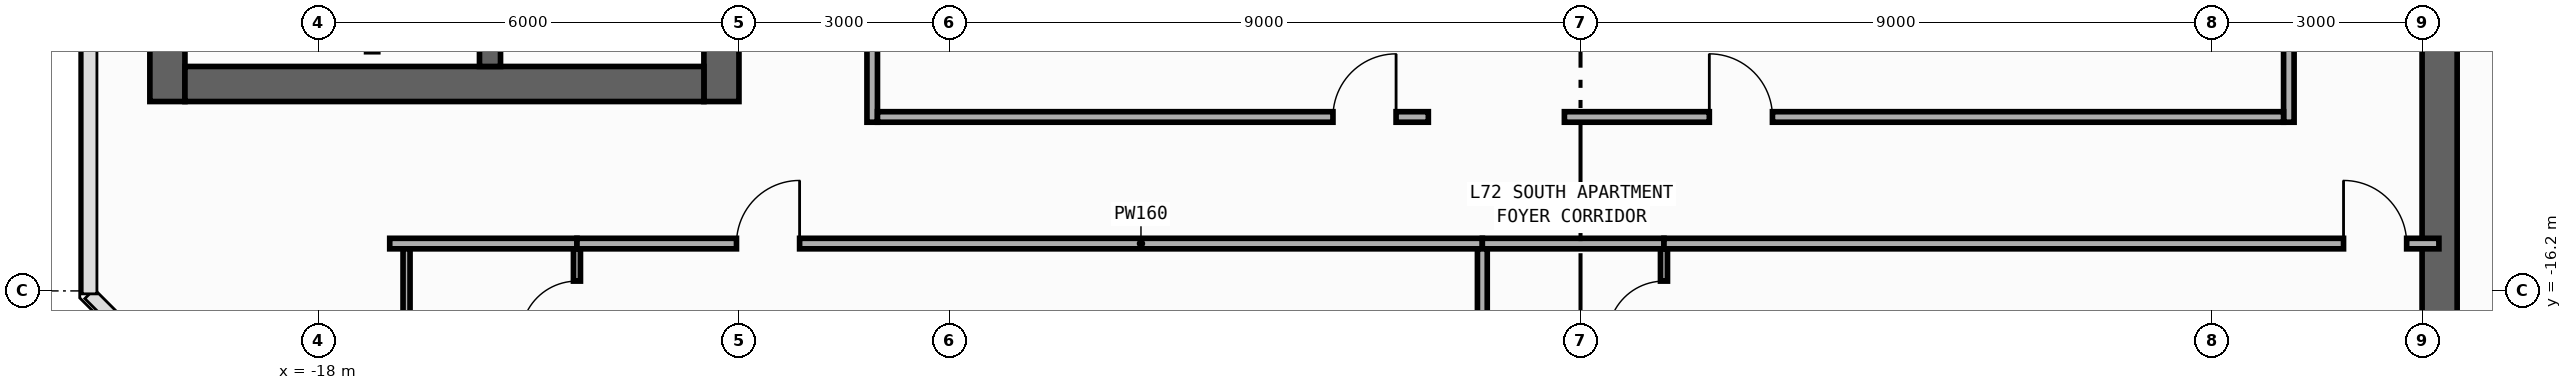
"""IFC4 building model, lengths in metres.
Left out: names, types, materials, properties, quantities, classifications, styles, units other than length and angle.
Written with IfcOpenShell. Run it as: python <this file> out.ifc"""

import sys

from ifc_helpers import new_model, si_unit, direction, frame, frame_2d, origin, place, context, subcontext, project, spatial, rectangle, extrude, element, fill, save


model = new_model("IFC4")
c1 = context("Model", 3, precision=1e-05, world=origin(), true_north=direction((0.0, 1.0)))
c2 = subcontext(c1, "Body", "Model", "MODEL_VIEW")
j1 = project(units=[si_unit("LENGTHUNIT", "METRE"), si_unit("PLANEANGLEUNIT", "RADIAN")], contexts=[c1])
p1 = place(None, origin())
s1 = spatial("IfcSite", under=j1, at=p1, CompositionType="ELEMENT")
p2 = place(p1, origin())
s2 = spatial("IfcBuilding", under=s1, at=p2, CompositionType="ELEMENT")
p3 = place(p2, frame((0.0, 0.0, 300.4)))
s3 = spatial("IfcBuildingStorey", under=s2, at=p3, CompositionType="ELEMENT", Elevation=300.4)
p4 = place(p3, frame((-20.15, -13.5, 0.0), z_axis=(0.0, 0.0, 1.0), x_axis=(0.0, 1.0, 0.0)))
e1 = element("IfcWall", 1, at=p4, inside=s3, PredefinedType="SHEAR", context=c2, shape_type="SweptSolid", body=[
    extrude(rectangle(XDim=27.0, YDim=0.5, at=frame_2d((13.5, 0.0))), origin(), (0.0, 0.0, 1.0), 3.54),
])
p5 = place(p3, frame((-12.25, -13.5, 0.0), z_axis=(0.0, 0.0, 1.0), x_axis=(0.0, 1.0, 0.0)))
e2 = element("IfcWall", 2, at=p5, inside=s3, PredefinedType="SHEAR", context=c2, shape_type="SweptSolid", body=[
    extrude(rectangle(XDim=27.0, YDim=0.5, at=frame_2d((13.5, 0.0))), origin(), (0.0, 0.0, 1.0), 3.54),
])
p6 = place(p5, frame((15.175, 0.0, 0.0)))
e3 = element("IfcOpeningElement", 3, at=p6, cuts=e2, PredefinedType="OPENING", context=c2, shape_type="SweptSolid", body=[
    extrude(rectangle(XDim=0.85, YDim=2.1, at=frame_2d((0.425, 1.05))), frame((0.0, 0.26, 0.0), z_axis=(0.0, -1.0, 0.0), x_axis=(1.0, 0.0, 0.0)), (0.0, 0.0, 1.0), 0.52),
])
p7 = place(p5, frame((21.275, 0.0, 0.0)))
e4 = element("IfcOpeningElement", 4, at=p7, cuts=e2, PredefinedType="OPENING", context=c2, shape_type="SweptSolid", body=[
    extrude(rectangle(XDim=0.85, YDim=2.1, at=frame_2d((0.425, 1.05))), frame((0.0, 0.26, 0.0), z_axis=(0.0, -1.0, 0.0), x_axis=(1.0, 0.0, 0.0)), (0.0, 0.0, 1.0), 0.52),
])
p8 = place(p5, frame((4.275, 0.0, 0.0)))
e5 = element("IfcOpeningElement", 5, at=p8, cuts=e2, PredefinedType="OPENING", context=c2, shape_type="SweptSolid", body=[
    extrude(rectangle(XDim=0.85, YDim=2.1, at=frame_2d((0.425, 1.05))), frame((0.0, 0.26, 0.0), z_axis=(0.0, -1.0, 0.0), x_axis=(1.0, 0.0, 0.0)), (0.0, 0.0, 1.0), 0.52),
])
p9 = place(p5, frame((10.275, 0.0, 0.0)))
e6 = element("IfcOpeningElement", 6, at=p9, cuts=e2, PredefinedType="OPENING", context=c2, shape_type="SweptSolid", body=[
    extrude(rectangle(XDim=0.85, YDim=2.1, at=frame_2d((0.425, 1.05))), frame((0.0, 0.26, 0.0), z_axis=(0.0, -1.0, 0.0), x_axis=(1.0, 0.0, 0.0)), (0.0, 0.0, 1.0), 0.52),
])
p10 = place(p5, frame((12.725, 0.0, 0.0)))
e7 = element("IfcOpeningElement", 7, at=p10, cuts=e2, PredefinedType="OPENING", context=c2, shape_type="SweptSolid", body=[
    extrude(rectangle(XDim=1.15, YDim=2.2, at=frame_2d((0.575, 1.1))), frame((0.0, 0.26, 0.0), z_axis=(0.0, -1.0, 0.0), x_axis=(1.0, 0.0, 0.0)), (0.0, 0.0, 1.0), 0.52),
])
p11 = place(p5, frame((1.625, 0.0, 0.0)))
e8 = element("IfcOpeningElement", 8, at=p11, cuts=e2, PredefinedType="OPENING", context=c2, shape_type="SweptSolid", body=[
    extrude(rectangle(XDim=0.85, YDim=2.1, at=frame_2d((0.425, 1.05))), frame((0.0, 0.26, 0.0), z_axis=(0.0, -1.0, 0.0), x_axis=(1.0, 0.0, 0.0)), (0.0, 0.0, 1.0), 0.52),
])
p12 = place(p3, frame((-19.9, -13.25, 0.0), z_axis=(0.0, 0.0, 1.0), x_axis=(1.0, 0.0, 0.0)))
e9 = element("IfcWall", 9, at=p12, inside=s3, PredefinedType="SHEAR", context=c2, shape_type="SweptSolid", body=[
    extrude(rectangle(XDim=7.4, YDim=0.5, at=frame_2d((3.7, 0.0))), origin(), (0.0, 0.0, 1.0), 3.54),
])
p13 = place(p3, frame((-15.55, -13.0, 0.0), z_axis=(0.0, 0.0, 1.0), x_axis=(0.0, 1.0, 0.0)))
e10 = element("IfcWall", 10, at=p13, inside=s3, PredefinedType="SHEAR", context=c2, shape_type="SweptSolid", body=[
    extrude(rectangle(XDim=26.0, YDim=0.3, at=frame_2d((13.0, 0.0))), origin(), (0.0, 0.0, 1.0), 3.54),
])
p14 = place(p13, frame((12.225, 0.0, 0.0)))
e11 = element("IfcOpeningElement", 11, at=p14, cuts=e10, PredefinedType="OPENING", context=c2, shape_type="SweptSolid", body=[
    extrude(rectangle(XDim=1.15, YDim=2.2, at=frame_2d((0.575, 1.1))), frame((0.0, 0.16, 0.0), z_axis=(0.0, -1.0, 0.0), x_axis=(1.0, 0.0, 0.0)), (0.0, 0.0, 1.0), 0.32),
])
p15 = place(p13, frame((1.125, 0.0, 0.0)))
e12 = element("IfcOpeningElement", 12, at=p15, cuts=e10, PredefinedType="OPENING", context=c2, shape_type="SweptSolid", body=[
    extrude(rectangle(XDim=0.85, YDim=2.1, at=frame_2d((0.425, 1.05))), frame((0.0, 0.16, 0.0), z_axis=(0.0, -1.0, 0.0), x_axis=(1.0, 0.0, 0.0)), (0.0, 0.0, 1.0), 0.32),
])
p16 = place(p3, frame((12.25, -19.8, 0.0), z_axis=(0.0, 0.0, 1.0), x_axis=(0.0, 1.0, 0.0)))
e13 = element("IfcWall", 13, at=p16, inside=s3, PredefinedType="SHEAR", context=c2, shape_type="SweptSolid", body=[
    extrude(rectangle(XDim=27.0, YDim=0.5, at=frame_2d((13.5, 0.0))), origin(), (0.0, 0.0, 1.0), 3.54),
])
p17 = place(p16, frame((23.05, 0.0, 0.0)))
e14 = element("IfcOpeningElement", 14, at=p17, cuts=e13, PredefinedType="OPENING", context=c2, shape_type="SweptSolid", body=[
    extrude(rectangle(XDim=1.1, YDim=2.2, at=frame_2d((0.55, 1.1))), frame((0.0, 0.26, 0.0), z_axis=(0.0, -1.0, 0.0), x_axis=(1.0, 0.0, 0.0)), (0.0, 0.0, 1.0), 0.52),
])
p18 = place(p16, frame((19.85, 0.0, 0.0)))
e15 = element("IfcOpeningElement", 15, at=p18, cuts=e13, PredefinedType="OPENING", context=c2, shape_type="SweptSolid", body=[
    extrude(rectangle(XDim=1.1, YDim=2.2, at=frame_2d((0.55, 1.1))), frame((0.0, 0.26, 0.0), z_axis=(0.0, -1.0, 0.0), x_axis=(1.0, 0.0, 0.0)), (0.0, 0.0, 1.0), 0.52),
])
p19 = place(p16, frame((16.65, 0.0, 0.0)))
e16 = element("IfcOpeningElement", 16, at=p19, cuts=e13, PredefinedType="OPENING", context=c2, shape_type="SweptSolid", body=[
    extrude(rectangle(XDim=1.1, YDim=2.2, at=frame_2d((0.55, 1.1))), frame((0.0, 0.26, 0.0), z_axis=(0.0, -1.0, 0.0), x_axis=(1.0, 0.0, 0.0)), (0.0, 0.0, 1.0), 0.52),
])
p20 = place(p16, frame((7.175, 0.0, 0.0)))
e17 = element("IfcOpeningElement", 17, at=p20, cuts=e13, PredefinedType="OPENING", context=c2, shape_type="SweptSolid", body=[
    extrude(rectangle(XDim=0.85, YDim=2.1, at=frame_2d((0.425, 1.05))), frame((0.0, 0.26, 0.0), z_axis=(0.0, -1.0, 0.0), x_axis=(1.0, 0.0, 0.0)), (0.0, 0.0, 1.0), 0.52),
])
p21 = place(p16, frame((10.375, 0.0, 0.0)))
e18 = element("IfcOpeningElement", 18, at=p21, cuts=e13, PredefinedType="OPENING", context=c2, shape_type="SweptSolid", body=[
    extrude(rectangle(XDim=0.85, YDim=2.1, at=frame_2d((0.425, 1.05))), frame((0.0, 0.26, 0.0), z_axis=(0.0, -1.0, 0.0), x_axis=(1.0, 0.0, 0.0)), (0.0, 0.0, 1.0), 0.52),
])
p22 = place(p16, frame((12.725, 0.0, 0.0)))
e19 = element("IfcOpeningElement", 19, at=p22, cuts=e13, PredefinedType="OPENING", context=c2, shape_type="SweptSolid", body=[
    extrude(rectangle(XDim=1.15, YDim=2.2, at=frame_2d((0.575, 1.1))), frame((0.0, 0.26, 0.0), z_axis=(0.0, -1.0, 0.0), x_axis=(1.0, 0.0, 0.0)), (0.0, 0.0, 1.0), 0.52),
])
p23 = place(p16, frame((25.125, 0.0, 0.0)))
e20 = element("IfcOpeningElement", 20, at=p23, cuts=e13, PredefinedType="OPENING", context=c2, shape_type="SweptSolid", body=[
    extrude(rectangle(XDim=0.85, YDim=2.1, at=frame_2d((0.425, 1.05))), frame((0.0, 0.26, 0.0), z_axis=(0.0, -1.0, 0.0), x_axis=(1.0, 0.0, 0.0)), (0.0, 0.0, 1.0), 0.52),
])
p24 = place(p3, frame((-10.1, -13.795, 0.0), z_axis=(0.0, 0.0, 1.0), x_axis=(0.0, 1.0, 0.0)))
e21 = element("IfcWall", 21, at=p24, inside=s3, PredefinedType="PARTITIONING", context=c2, shape_type="SweptSolid", body=[
    extrude(rectangle(XDim=11.205, YDim=0.15, at=frame_2d((5.603, 0.0))), origin(), (0.0, 0.0, 1.0), 3.54),
])
p25 = place(p24, frame((8.009, 0.0, 0.0)))
e22 = element("IfcOpeningElement", 22, at=p25, cuts=e21, PredefinedType="OPENING", context=c2, shape_type="SweptSolid", body=[
    extrude(rectangle(XDim=0.9, YDim=2.15, at=frame_2d((0.45, 1.075))), frame((0.0, 0.085, 0.0), z_axis=(0.0, -1.0, 0.0), x_axis=(1.0, 0.0, 0.0)), (0.0, 0.0, 1.0), 0.17),
])
p26 = place(p3, frame((10.1, -13.795, 0.0), z_axis=(0.0, 0.0, 1.0), x_axis=(0.0, 1.0, 0.0)))
e23 = element("IfcWall", 23, at=p26, inside=s3, PredefinedType="PARTITIONING", context=c2, shape_type="SweptSolid", body=[
    extrude(rectangle(XDim=8.575, YDim=0.15, at=frame_2d((4.288, 0.0))), origin(), (0.0, 0.0, 1.0), 3.54),
])
p27 = place(p26, frame((7.215, 0.0, 0.0)))
e24 = element("IfcOpeningElement", 24, at=p27, cuts=e23, PredefinedType="OPENING", context=c2, shape_type="SweptSolid", body=[
    extrude(rectangle(XDim=0.9, YDim=2.15, at=frame_2d((0.45, 1.075))), frame((0.0, 0.085, 0.0), z_axis=(0.0, -1.0, 0.0), x_axis=(1.0, 0.0, 0.0)), (0.0, 0.0, 1.0), 0.17),
])
p28 = place(p3, frame((-16.98, -15.525, 0.0), z_axis=(0.0, 0.0, 1.0), x_axis=(1.0, 0.0, 0.0)))
e25 = element("IfcWall", 25, at=p28, inside=s3, PredefinedType="PARTITIONING", context=c2, shape_type="SweptSolid", body=[
    extrude(rectangle(XDim=2.67, YDim=0.15, at=frame_2d((1.335, 0.0))), origin(), (0.0, 0.0, 1.0), 3.54),
])
p29 = place(p3, frame((-14.31, -15.525, 0.0), z_axis=(0.0, 0.0, 1.0), x_axis=(1.0, 0.0, 0.0)))
e26 = element("IfcWall", 26, at=p29, inside=s3, PredefinedType="PARTITIONING", context=c2, shape_type="SweptSolid", body=[
    extrude(rectangle(XDim=12.91, YDim=0.15, at=frame_2d((6.455, 0.0))), origin(), (0.0, 0.0, 1.0), 3.54),
])
p30 = place(p29, frame((2.275, 0.0, 0.0)))
e27 = element("IfcOpeningElement", 27, at=p30, cuts=e26, PredefinedType="OPENING", context=c2, shape_type="SweptSolid", body=[
    extrude(rectangle(XDim=0.9, YDim=2.15, at=frame_2d((0.45, 1.075))), frame((0.0, 0.085, 0.0), z_axis=(0.0, -1.0, 0.0), x_axis=(1.0, 0.0, 0.0)), (0.0, 0.0, 1.0), 0.17),
])
p31 = place(p3, frame((-1.4, -15.525, 0.0), z_axis=(0.0, 0.0, 1.0), x_axis=(1.0, 0.0, 0.0)))
e28 = element("IfcWall", 28, at=p31, inside=s3, PredefinedType="PARTITIONING", context=c2, shape_type="SweptSolid", body=[
    extrude(rectangle(XDim=2.59, YDim=0.15, at=frame_2d((1.295, 0.0))), origin(), (0.0, 0.0, 1.0), 3.54),
])
p32 = place(p3, frame((1.19, -15.525, 0.0), z_axis=(0.0, 0.0, 1.0), x_axis=(1.0, 0.0, 0.0)))
e29 = element("IfcWall", 29, at=p32, inside=s3, PredefinedType="PARTITIONING", context=c2, shape_type="SweptSolid", body=[
    extrude(rectangle(XDim=11.05, YDim=0.15, at=frame_2d((5.525, 0.0))), origin(), (0.0, 0.0, 1.0), 3.54),
])
p33 = place(p32, frame((9.69, 0.0, 0.0)))
e30 = element("IfcOpeningElement", 30, at=p33, cuts=e29, PredefinedType="OPENING", context=c2, shape_type="SweptSolid", body=[
    extrude(rectangle(XDim=0.9, YDim=2.15, at=frame_2d((0.45, 1.075))), frame((0.0, 0.085, 0.0), z_axis=(0.0, -1.0, 0.0), x_axis=(1.0, 0.0, 0.0)), (0.0, 0.0, 1.0), 0.17),
])
p34 = place(p3, frame((-10.025, -13.72, 0.0), z_axis=(0.0, 0.0, 1.0), x_axis=(1.0, 0.0, 0.0)))
e31 = element("IfcWall", 31, at=p34, inside=s3, PredefinedType="PARTITIONING", context=c2, shape_type="SweptSolid", body=[
    extrude(rectangle(XDim=7.855, YDim=0.15, at=frame_2d((3.927, 0.0))), origin(), (0.0, 0.0, 1.0), 3.54),
])
p35 = place(p34, frame((6.495, 0.0, 0.0)))
e32 = element("IfcOpeningElement", 32, at=p35, cuts=e31, PredefinedType="OPENING", context=c2, shape_type="SweptSolid", body=[
    extrude(rectangle(XDim=0.9, YDim=2.15, at=frame_2d((0.45, 1.075))), frame((0.0, 0.085, 0.0), z_axis=(0.0, -1.0, 0.0), x_axis=(1.0, 0.0, 0.0)), (0.0, 0.0, 1.0), 0.17),
])
p36 = place(p3, frame((-0.23, -13.72, 0.0), z_axis=(0.0, 0.0, 1.0), x_axis=(1.0, 0.0, 0.0)))
e33 = element("IfcWall", 33, at=p36, inside=s3, PredefinedType="PARTITIONING", context=c2, shape_type="SweptSolid", body=[
    extrude(rectangle(XDim=10.255, YDim=0.15, at=frame_2d((5.127, 0.0))), origin(), (0.0, 0.0, 1.0), 3.54),
])
p37 = place(p36, frame((2.067, 0.0, 0.0)))
e34 = element("IfcOpeningElement", 34, at=p37, cuts=e33, PredefinedType="OPENING", context=c2, shape_type="SweptSolid", body=[
    extrude(rectangle(XDim=0.9, YDim=2.15, at=frame_2d((0.45, 1.075))), frame((0.0, 0.085, 0.0), z_axis=(0.0, -1.0, 0.0), x_axis=(1.0, 0.0, 0.0)), (0.0, 0.0, 1.0), 0.17),
])
p38 = place(p3, frame((-14.31, -18.1, 0.0), z_axis=(0.0, 0.0, 1.0), x_axis=(0.0, 1.0, 0.0)))
e35 = element("IfcWall", 35, at=p38, inside=s3, PredefinedType="PARTITIONING", context=c2, shape_type="SweptSolid", body=[
    extrude(rectangle(XDim=2.5, YDim=0.1, at=frame_2d((1.25, 0.0))), origin(), (0.0, 0.0, 1.0), 2.64),
])
p39 = place(p38, frame((1.24, 0.0, 0.0)))
e36 = element("IfcOpeningElement", 36, at=p39, cuts=e35, PredefinedType="OPENING", context=c2, shape_type="SweptSolid", body=[
    extrude(rectangle(XDim=0.8, YDim=2.1, at=frame_2d((0.4, 1.05))), frame((0.0, 0.06, 0.0), z_axis=(0.0, -1.0, 0.0), x_axis=(1.0, 0.0, 0.0)), (0.0, 0.0, 1.0), 0.12),
])
p40 = place(p3, frame((-1.4, -18.1, 0.0), z_axis=(0.0, 0.0, 1.0), x_axis=(0.0, 1.0, 0.0)))
e37 = element("IfcWall", 37, at=p40, inside=s3, PredefinedType="PARTITIONING", context=c2, shape_type="SweptSolid", body=[
    extrude(rectangle(XDim=2.5, YDim=0.14, at=frame_2d((1.25, 0.0))), origin(), (0.0, 0.0, 1.0), 3.54),
])
p41 = place(p3, frame((1.19, -18.1, 0.0), z_axis=(0.0, 0.0, 1.0), x_axis=(0.0, 1.0, 0.0)))
e38 = element("IfcWall", 38, at=p41, inside=s3, PredefinedType="PARTITIONING", context=c2, shape_type="SweptSolid", body=[
    extrude(rectangle(XDim=2.5, YDim=0.1, at=frame_2d((1.25, 0.0))), origin(), (0.0, 0.0, 1.0), 3.54),
])
p42 = place(p41, frame((1.24, 0.0, 0.0)))
e39 = element("IfcOpeningElement", 39, at=p42, cuts=e38, PredefinedType="OPENING", context=c2, shape_type="SweptSolid", body=[
    extrude(rectangle(XDim=0.8, YDim=2.1, at=frame_2d((0.4, 1.05))), frame((0.0, 0.06, 0.0), z_axis=(0.0, -1.0, 0.0), x_axis=(1.0, 0.0, 0.0)), (0.0, 0.0, 1.0), 0.12),
])
p43 = place(p3, frame((-16.74, -18.05, 0.0), z_axis=(0.0, 0.0, 1.0), x_axis=(0.0, 1.0, 0.0)))
e40 = element("IfcWall", 40, at=p43, inside=s3, PredefinedType="PARTITIONING", context=c2, shape_type="SweptSolid", body=[
    extrude(rectangle(XDim=2.45, YDim=0.1, at=frame_2d((1.225, 0.0))), origin(), (0.0, 0.0, 1.0), 3.54),
])
p44 = place(p30, origin())
e41 = element("IfcDoor", 41, at=p44, inside=s3, OperationType="SINGLE_SWING_RIGHT", PredefinedType="DOOR", context=c2, shape_type="SweptSolid", body=[
    extrude(rectangle(XDim=0.9, YDim=2.15, at=frame_2d((0.45, 1.075))), frame((0.0, 0.025, 0.0), z_axis=(0.0, -1.0, 0.0), x_axis=(1.0, 0.0, 0.0)), (0.0, 0.0, 1.0), 0.05),
])
fill(e27, e41)
p45 = place(p33, origin())
e42 = element("IfcDoor", 42, at=p45, inside=s3, OperationType="SINGLE_SWING_LEFT", PredefinedType="DOOR", context=c2, shape_type="SweptSolid", body=[
    extrude(rectangle(XDim=0.9, YDim=2.15, at=frame_2d((0.45, 1.075))), frame((0.0, 0.025, 0.0), z_axis=(0.0, -1.0, 0.0), x_axis=(1.0, 0.0, 0.0)), (0.0, 0.0, 1.0), 0.05),
])
fill(e30, e42)
p46 = place(p35, origin())
e43 = element("IfcDoor", 43, at=p46, inside=s3, OperationType="SINGLE_SWING_RIGHT", PredefinedType="DOOR", context=c2, shape_type="SweptSolid", body=[
    extrude(rectangle(XDim=0.9, YDim=2.15, at=frame_2d((0.45, 1.075))), frame((0.0, 0.025, 0.0), z_axis=(0.0, -1.0, 0.0), x_axis=(1.0, 0.0, 0.0)), (0.0, 0.0, 1.0), 0.05),
])
fill(e32, e43)
p47 = place(p37, origin())
e44 = element("IfcDoor", 44, at=p47, inside=s3, OperationType="SINGLE_SWING_LEFT", PredefinedType="DOOR", context=c2, shape_type="SweptSolid", body=[
    extrude(rectangle(XDim=0.9, YDim=2.15, at=frame_2d((0.45, 1.075))), frame((0.0, 0.025, 0.0), z_axis=(0.0, -1.0, 0.0), x_axis=(1.0, 0.0, 0.0)), (0.0, 0.0, 1.0), 0.05),
])
fill(e34, e44)
p48 = place(p39, origin())
e45 = element("IfcDoor", 45, at=p48, inside=s3, OperationType="SINGLE_SWING_LEFT", PredefinedType="DOOR", context=c2, shape_type="SweptSolid", body=[
    extrude(rectangle(XDim=0.8, YDim=2.1, at=frame_2d((0.4, 1.05))), frame((0.0, 0.025, 0.0), z_axis=(0.0, -1.0, 0.0), x_axis=(1.0, 0.0, 0.0)), (0.0, 0.0, 1.0), 0.05),
])
fill(e36, e45)
p49 = place(p42, origin())
e46 = element("IfcDoor", 46, at=p49, inside=s3, OperationType="SINGLE_SWING_LEFT", PredefinedType="DOOR", context=c2, shape_type="SweptSolid", body=[
    extrude(rectangle(XDim=0.8, YDim=2.1, at=frame_2d((0.4, 1.05))), frame((0.0, 0.025, 0.0), z_axis=(0.0, -1.0, 0.0), x_axis=(1.0, 0.0, 0.0)), (0.0, 0.0, 1.0), 0.05),
])
fill(e39, e46)
save(model, sys.argv[1])
